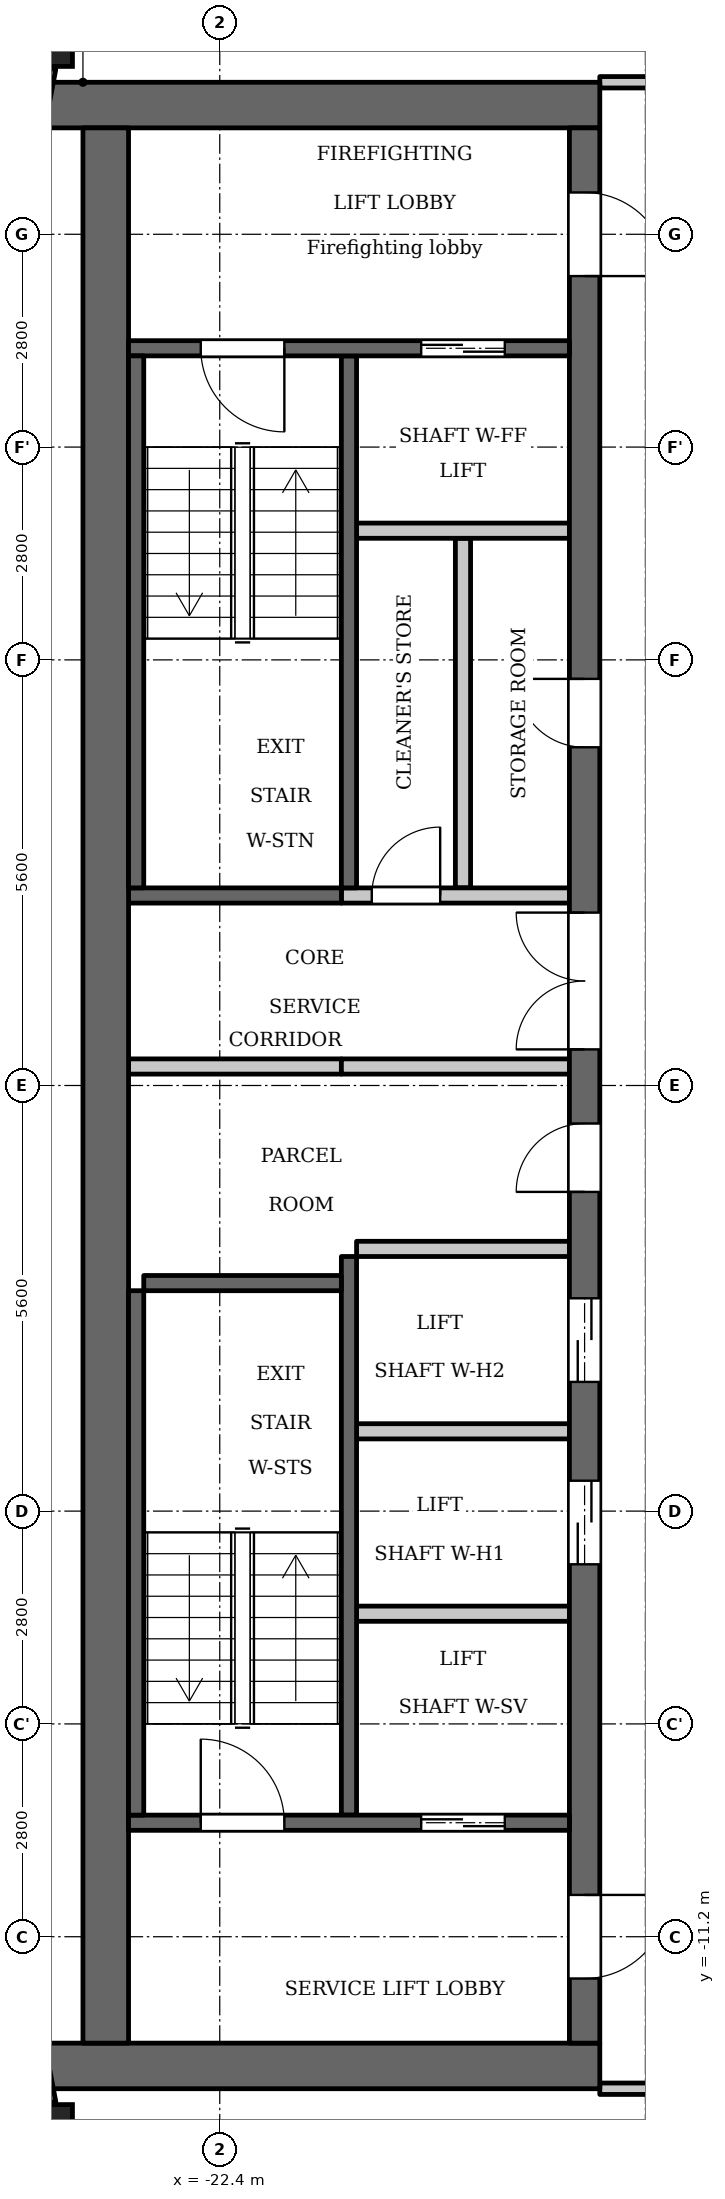
"""IFC4 building model, lengths in metres.
Left out: names, types, materials, properties, quantities, classifications, styles, units other than length and angle.
Written with IfcOpenShell. Run it as: python <this file> out.ifc"""

import sys

from ifc_helpers import new_model, si_unit, direction, frame, frame_2d, origin, origin_2d, place, context, subcontext, project, spatial, rectangle, extrude, element, fill, save


model = new_model("IFC4")
c1 = context("Model", 3, precision=1e-05, world=origin(), true_north=direction((0.0, 1.0)))
c2 = subcontext(c1, "Body", "Model", "MODEL_VIEW")
j1 = project(units=[si_unit("LENGTHUNIT", "METRE"), si_unit("PLANEANGLEUNIT", "RADIAN")], contexts=[c1])
p1 = place(None, origin())
s1 = spatial("IfcSite", under=j1, at=p1, CompositionType="ELEMENT")
p2 = place(p1, origin())
s2 = spatial("IfcBuilding", under=s1, at=p2, CompositionType="ELEMENT")
p3 = place(p2, frame((0.0, 0.0, 252.2)))
s3 = spatial("IfcBuildingStorey", under=s2, at=p3, CompositionType="ELEMENT", Elevation=252.2)
for number, where, z_axis, x_axis in (
    (1, (-24.738, 13.809, 0.0), (0.0, 0.0, 1.0), (1.0, 0.0, 0.0)),
    (2, (-24.738, -13.809, 0.0), (0.0, 0.0, 1.0), (1.0, 0.0, 0.0)),
):
    element("IfcColumn", number, at=place(p3, frame(where, z_axis=z_axis, x_axis=x_axis)), inside=s3, PredefinedType="COLUMN", context=c2, shape_type="SweptSolid", body=[
        extrude(rectangle(XDim=0.8, YDim=0.8, at=origin_2d()), origin(), (0.0, 0.0, 1.0), 3.5),
    ])
for number, where, z_axis, x_axis in (
    (3, (-24.705, 13.395, 0.0), (0.0, 0.0, 1.0), (-0.187, -0.982, 0.0)),
    (4, (-25.053, -11.572, 0.0), (0.0, 0.0, 1.0), (0.187, -0.982, 0.0)),
):
    element("IfcWall", number, at=place(p3, frame(where, z_axis=z_axis, x_axis=x_axis)), inside=s3, PredefinedType="SOLIDWALL", context=c2, shape_type="SweptSolid", body=[
        extrude(rectangle(XDim=1.856, YDim=0.3, at=frame_2d((0.928, 0.0))), origin(), (0.0, 0.0, 1.0), 2.55),
    ])
p4 = place(p3, frame((-20.7, 2.6, 0.0), z_axis=(0.0, 0.0, 1.0), x_axis=(0.0, 1.0, 0.0)))
e5 = element("IfcWall", 5, at=p4, inside=s3, PredefinedType="SHEAR", context=c2, shape_type="SweptSolid", body=[
    extrude(rectangle(XDim=7.0, YDim=0.2, at=frame_2d((3.5, 0.0))), origin(), (0.0, 0.0, 1.0), 3.2),
])
p5 = place(p3, frame((-20.7, -9.6, 0.0), z_axis=(0.0, 0.0, 1.0), x_axis=(0.0, 1.0, 0.0)))
e6 = element("IfcWall", 6, at=p5, inside=s3, PredefinedType="SHEAR", context=c2, shape_type="SweptSolid", body=[
    extrude(rectangle(XDim=7.35, YDim=0.2, at=frame_2d((3.675, 0.0))), origin(), (0.0, 0.0, 1.0), 3.2),
])
p6 = place(p3, frame((-20.8, 2.5, 0.0), z_axis=(0.0, 0.0, 1.0), x_axis=(-1.0, 0.0, 0.0)))
e7 = element("IfcWall", 7, at=p6, inside=s3, PredefinedType="SHEAR", context=c2, shape_type="SweptSolid", body=[
    extrude(rectangle(XDim=2.8, YDim=0.2, at=frame_2d((1.4, 0.0))), origin(), (0.0, 0.0, 1.0), 3.2),
])
p7 = place(p3, frame((-20.8, 0.25, 0.0), z_axis=(0.0, 0.0, 1.0), x_axis=(-1.0, 0.0, 0.0)))
e8 = element("IfcWall", 8, at=p7, inside=s3, PredefinedType="PARTITIONING", context=c2, shape_type="SweptSolid", body=[
    extrude(rectangle(XDim=2.8, YDim=0.2, at=frame_2d((1.4, 0.0))), origin(), (0.0, 0.0, 1.0), 3.2),
])
for number, where, z_axis, x_axis in (
    (9, (-17.4, 12.9, 0.0), (0.0, 0.0, 1.0), (-1.0, 0.0, 0.0)),
    (10, (-17.4, -12.9, 0.0), (0.0, 0.0, 1.0), (-1.0, 0.0, 0.0)),
):
    element("IfcWall", number, at=place(p3, frame(where, z_axis=z_axis, x_axis=x_axis)), inside=s3, PredefinedType="SHEAR", context=c2, shape_type="SweptSolid", body=[
        extrude(rectangle(XDim=7.32, YDim=0.6, at=frame_2d((3.66, 0.0))), origin(), (0.0, 0.0, 1.0), 3.2),
    ])
p8 = place(p3, frame((-19.2, 2.6, 0.0), z_axis=(0.0, 0.0, 1.0), x_axis=(0.0, 1.0, 0.0)))
e11 = element("IfcWall", 11, at=p8, inside=s3, PredefinedType="PARTITIONING", context=c2, shape_type="SweptSolid", body=[
    extrude(rectangle(XDim=4.6, YDim=0.2, at=frame_2d((2.3, 0.0))), origin(), (0.0, 0.0, 1.0), 3.2),
])
p9 = place(p3, frame((-17.6, -12.6, 0.0), z_axis=(0.0, 0.0, 1.0), x_axis=(0.0, 1.0, 0.0)))
e12 = element("IfcWall", 12, at=p9, inside=s3, PredefinedType="SHEAR", context=c2, shape_type="SweptSolid", body=[
    extrude(rectangle(XDim=25.2, YDim=0.4, at=frame_2d((12.6, 0.0))), origin(), (0.0, 0.0, 1.0), 3.2),
])
p10 = place(p9, frame((6.3, 0.0, 0.0)))
e13 = element("IfcOpeningElement", 13, at=p10, cuts=e12, PredefinedType="OPENING", context=c2, shape_type="SweptSolid", body=[
    extrude(rectangle(XDim=1.1, YDim=2.1, at=frame_2d((0.55, 1.05))), frame((0.0, 0.21, 0.0), z_axis=(0.0, -1.0, 0.0), x_axis=(1.0, 0.0, 0.0)), (0.0, 0.0, 1.0), 0.42),
])
p11 = place(p9, frame((8.7, 0.0, 0.0)))
e14 = element("IfcOpeningElement", 14, at=p11, cuts=e12, PredefinedType="OPENING", context=c2, shape_type="SweptSolid", body=[
    extrude(rectangle(XDim=1.1, YDim=2.1, at=frame_2d((0.55, 1.05))), frame((0.0, 0.21, 0.0), z_axis=(0.0, -1.0, 0.0), x_axis=(1.0, 0.0, 0.0)), (0.0, 0.0, 1.0), 0.42),
])
p12 = place(p9, frame((11.2, 0.0, 0.0)))
e15 = element("IfcOpeningElement", 15, at=p12, cuts=e12, PredefinedType="OPENING", context=c2, shape_type="SweptSolid", body=[
    extrude(rectangle(XDim=0.9, YDim=2.1, at=frame_2d((0.45, 1.05))), frame((0.0, 0.21, 0.0), z_axis=(0.0, -1.0, 0.0), x_axis=(1.0, 0.0, 0.0)), (0.0, 0.0, 1.0), 0.42),
])
p13 = place(p9, frame((17.05, 0.0, 0.0)))
e16 = element("IfcOpeningElement", 16, at=p13, cuts=e12, PredefinedType="OPENING", context=c2, shape_type="SweptSolid", body=[
    extrude(rectangle(XDim=0.9, YDim=2.1, at=frame_2d((0.45, 1.05))), frame((0.0, 0.21, 0.0), z_axis=(0.0, -1.0, 0.0), x_axis=(1.0, 0.0, 0.0)), (0.0, 0.0, 1.0), 0.42),
])
p14 = place(p9, frame((23.25, 0.0, 0.0)))
e17 = element("IfcOpeningElement", 17, at=p14, cuts=e12, PredefinedType="OPENING", context=c2, shape_type="SweptSolid", body=[
    extrude(rectangle(XDim=1.1, YDim=2.1, at=frame_2d((0.55, 1.05))), frame((0.0, 0.21, 0.0), z_axis=(0.0, -1.0, 0.0), x_axis=(1.0, 0.0, 0.0)), (0.0, 0.0, 1.0), 0.42),
])
p15 = place(p9, frame((0.85, 0.0, 0.0)))
e18 = element("IfcOpeningElement", 18, at=p15, cuts=e12, PredefinedType="OPENING", context=c2, shape_type="SweptSolid", body=[
    extrude(rectangle(XDim=1.1, YDim=2.1, at=frame_2d((0.55, 1.05))), frame((0.0, 0.21, 0.0), z_axis=(0.0, -1.0, 0.0), x_axis=(1.0, 0.0, 0.0)), (0.0, 0.0, 1.0), 0.42),
])
p16 = place(p9, frame((13.075, 0.0, 0.0)))
e19 = element("IfcOpeningElement", 19, at=p16, cuts=e12, PredefinedType="OPENING", context=c2, shape_type="SweptSolid", body=[
    extrude(rectangle(XDim=1.8, YDim=2.1, at=frame_2d((0.9, 1.05))), frame((0.0, 0.21, 0.0), z_axis=(0.0, -1.0, 0.0), x_axis=(1.0, 0.0, 0.0)), (0.0, 0.0, 1.0), 0.42),
])
p17 = place(p3, frame((-23.9, -12.6, 0.0), z_axis=(0.0, 0.0, 1.0), x_axis=(0.0, 1.0, 0.0)))
e20 = element("IfcWall", 20, at=p17, inside=s3, PredefinedType="SHEAR", context=c2, shape_type="SweptSolid", body=[
    extrude(rectangle(XDim=25.2, YDim=0.6, at=frame_2d((12.6, 0.0))), origin(), (0.0, 0.0, 1.0), 3.2),
])
p18 = place(p3, frame((-17.8, -9.7, 0.0), z_axis=(0.0, 0.0, 1.0), x_axis=(-1.0, 0.0, 0.0)))
e21 = element("IfcWall", 21, at=p18, inside=s3, PredefinedType="SHEAR", context=c2, shape_type="SweptSolid", body=[
    extrude(rectangle(XDim=5.8, YDim=0.2, at=frame_2d((2.9, 0.0))), origin(), (0.0, 0.0, 1.0), 3.2),
])
p19 = place(p18, frame((0.85, 0.0, 0.0)))
e22 = element("IfcOpeningElement", 22, at=p19, cuts=e21, PredefinedType="OPENING", context=c2, shape_type="SweptSolid", body=[
    extrude(rectangle(XDim=1.1, YDim=2.1, at=frame_2d((0.55, 1.05))), frame((0.0, 0.11, 0.0), z_axis=(0.0, -1.0, 0.0), x_axis=(1.0, 0.0, 0.0)), (0.0, 0.0, 1.0), 0.22),
])
p20 = place(p18, frame((3.75, 0.0, 0.0)))
e23 = element("IfcOpeningElement", 23, at=p20, cuts=e21, PredefinedType="OPENING", context=c2, shape_type="SweptSolid", body=[
    extrude(rectangle(XDim=1.1, YDim=2.1, at=frame_2d((0.55, 1.05))), frame((0.0, 0.11, 0.0), z_axis=(0.0, -1.0, 0.0), x_axis=(1.0, 0.0, 0.0)), (0.0, 0.0, 1.0), 0.22),
])
for number, where, z_axis, x_axis in (
    (24, (-17.8, -6.95, 0.0), (0.0, 0.0, 1.0), (-1.0, 0.0, 0.0)),
    (25, (-17.8, -4.55, 0.0), (0.0, 0.0, 1.0), (-1.0, 0.0, 0.0)),
    (26, (-17.8, -2.15, 0.0), (0.0, 0.0, 1.0), (-1.0, 0.0, 0.0)),
):
    element("IfcWall", number, at=place(p3, frame(where, z_axis=z_axis, x_axis=x_axis)), inside=s3, PredefinedType="PARTITIONING", context=c2, shape_type="SweptSolid", body=[
        extrude(rectangle(XDim=2.8, YDim=0.2, at=frame_2d((1.4, 0.0))), origin(), (0.0, 0.0, 1.0), 3.2),
    ])
p21 = place(p3, frame((-17.8, 0.25, 0.0), z_axis=(0.0, 0.0, 1.0), x_axis=(-1.0, 0.0, 0.0)))
e27 = element("IfcWall", 27, at=p21, inside=s3, PredefinedType="PARTITIONING", context=c2, shape_type="SweptSolid", body=[
    extrude(rectangle(XDim=3.0, YDim=0.2, at=frame_2d((1.5, 0.0))), origin(), (0.0, 0.0, 1.0), 3.2),
])
p22 = place(p3, frame((-17.8, 2.5, 0.0), z_axis=(0.0, 0.0, 1.0), x_axis=(-1.0, 0.0, 0.0)))
e28 = element("IfcWall", 28, at=p22, inside=s3, PredefinedType="PARTITIONING", context=c2, shape_type="SweptSolid", body=[
    extrude(rectangle(XDim=3.0, YDim=0.2, at=frame_2d((1.5, 0.0))), origin(), (0.0, 0.0, 1.0), 3.2),
])
p23 = place(p22, frame((1.7, 0.0, 0.0)))
e29 = element("IfcOpeningElement", 29, at=p23, cuts=e28, PredefinedType="OPENING", context=c2, shape_type="SweptSolid", body=[
    extrude(rectangle(XDim=0.9, YDim=2.1, at=frame_2d((0.45, 1.05))), frame((0.0, 0.11, 0.0), z_axis=(0.0, -1.0, 0.0), x_axis=(1.0, 0.0, 0.0)), (0.0, 0.0, 1.0), 0.22),
])
p24 = place(p3, frame((-17.8, 7.3, 0.0), z_axis=(0.0, 0.0, 1.0), x_axis=(-1.0, 0.0, 0.0)))
e30 = element("IfcWall", 30, at=p24, inside=s3, PredefinedType="PARTITIONING", context=c2, shape_type="SweptSolid", body=[
    extrude(rectangle(XDim=2.8, YDim=0.2, at=frame_2d((1.4, 0.0))), origin(), (0.0, 0.0, 1.0), 3.2),
])
p25 = place(p3, frame((-17.8, 9.7, 0.0), z_axis=(0.0, 0.0, 1.0), x_axis=(-1.0, 0.0, 0.0)))
e31 = element("IfcWall", 31, at=p25, inside=s3, PredefinedType="SHEAR", context=c2, shape_type="SweptSolid", body=[
    extrude(rectangle(XDim=5.8, YDim=0.2, at=frame_2d((2.9, 0.0))), origin(), (0.0, 0.0, 1.0), 3.2),
])
p26 = place(p25, frame((0.85, 0.0, 0.0)))
e32 = element("IfcOpeningElement", 32, at=p26, cuts=e31, PredefinedType="OPENING", context=c2, shape_type="SweptSolid", body=[
    extrude(rectangle(XDim=1.1, YDim=2.1, at=frame_2d((0.55, 1.05))), frame((0.0, 0.11, 0.0), z_axis=(0.0, -1.0, 0.0), x_axis=(1.0, 0.0, 0.0)), (0.0, 0.0, 1.0), 0.22),
])
p27 = place(p25, frame((3.75, 0.0, 0.0)))
e33 = element("IfcOpeningElement", 33, at=p27, cuts=e31, PredefinedType="OPENING", context=c2, shape_type="SweptSolid", body=[
    extrude(rectangle(XDim=1.1, YDim=2.1, at=frame_2d((0.55, 1.05))), frame((0.0, 0.11, 0.0), z_axis=(0.0, -1.0, 0.0), x_axis=(1.0, 0.0, 0.0)), (0.0, 0.0, 1.0), 0.22),
])
p28 = place(p3, frame((-23.5, 2.6, 0.0), z_axis=(0.0, 0.0, 1.0), x_axis=(0.0, 1.0, 0.0)))
e34 = element("IfcWall", 34, at=p28, inside=s3, PredefinedType="SHEAR", context=c2, shape_type="SweptSolid", body=[
    extrude(rectangle(XDim=7.0, YDim=0.2, at=frame_2d((3.5, 0.0))), origin(), (0.0, 0.0, 1.0), 3.2),
])
p29 = place(p3, frame((-23.5, -9.6, 0.0), z_axis=(0.0, 0.0, 1.0), x_axis=(0.0, 1.0, 0.0)))
e35 = element("IfcWall", 35, at=p29, inside=s3, PredefinedType="SHEAR", context=c2, shape_type="SweptSolid", body=[
    extrude(rectangle(XDim=6.9, YDim=0.2, at=frame_2d((3.45, 0.0))), origin(), (0.0, 0.0, 1.0), 3.2),
])
p30 = place(p3, frame((-20.8, -2.6, 0.0), z_axis=(0.0, 0.0, 1.0), x_axis=(-1.0, 0.0, 0.0)))
e36 = element("IfcWall", 36, at=p30, inside=s3, PredefinedType="SHEAR", context=c2, shape_type="SweptSolid", body=[
    extrude(rectangle(XDim=2.6, YDim=0.2, at=frame_2d((1.3, 0.0))), origin(), (0.0, 0.0, 1.0), 3.2),
])
p31 = place(p3, frame((-17.4, -13.2, 0.0), z_axis=(0.0, 0.0, 1.0), x_axis=(1.0, 0.0, 0.0)))
e37 = element("IfcWall", 37, at=p31, inside=s3, PredefinedType="PARTITIONING", context=c2, shape_type="SweptSolid", body=[
    extrude(rectangle(XDim=2.325, YDim=0.15, at=frame_2d((1.163, 0.0))), origin(), (0.0, 0.0, 1.0), 3.2),
])
p32 = place(p31, frame((0.65, 0.0, 0.0)))
e38 = element("IfcOpeningElement", 38, at=p32, cuts=e37, PredefinedType="OPENING", context=c2, shape_type="SweptSolid", body=[
    extrude(rectangle(XDim=1.0, YDim=2.1, at=frame_2d((0.5, 1.05))), frame((0.0, 0.085, 0.0), z_axis=(0.0, -1.0, 0.0), x_axis=(1.0, 0.0, 0.0)), (0.0, 0.0, 1.0), 0.17),
])
p33 = place(p3, frame((-17.4, 13.2, 0.0), z_axis=(0.0, 0.0, 1.0), x_axis=(1.0, 0.0, 0.0)))
e39 = element("IfcWall", 39, at=p33, inside=s3, PredefinedType="PARTITIONING", context=c2, shape_type="SweptSolid", body=[
    extrude(rectangle(XDim=2.325, YDim=0.15, at=frame_2d((1.163, 0.0))), origin(), (0.0, 0.0, 1.0), 3.2),
])
p34 = place(p33, frame((0.75, 0.0, 0.0)))
e40 = element("IfcOpeningElement", 40, at=p34, cuts=e39, PredefinedType="OPENING", context=c2, shape_type="SweptSolid", body=[
    extrude(rectangle(XDim=1.0, YDim=2.1, at=frame_2d((0.5, 1.05))), frame((0.0, 0.085, 0.0), z_axis=(0.0, -1.0, 0.0), x_axis=(1.0, 0.0, 0.0)), (0.0, 0.0, 1.0), 0.17),
])
p35 = place(p19, origin())
e41 = element("IfcDoor", 41, at=p35, inside=s3, OperationType="DOUBLE_DOOR_SLIDING", PredefinedType="DOOR", context=c2, shape_type="SweptSolid", body=[
    extrude(rectangle(XDim=1.1, YDim=2.1, at=frame_2d((0.55, 1.05))), frame((0.0, 0.025, 0.0), z_axis=(0.0, -1.0, 0.0), x_axis=(1.0, 0.0, 0.0)), (0.0, 0.0, 1.0), 0.05),
])
fill(e22, e41)
p36 = place(p10, origin())
e42 = element("IfcDoor", 42, at=p36, inside=s3, OperationType="DOUBLE_DOOR_SLIDING", PredefinedType="DOOR", context=c2, shape_type="SweptSolid", body=[
    extrude(rectangle(XDim=1.1, YDim=2.1, at=frame_2d((0.55, 1.05))), frame((0.0, 0.025, 0.0), z_axis=(0.0, -1.0, 0.0), x_axis=(1.0, 0.0, 0.0)), (0.0, 0.0, 1.0), 0.05),
])
fill(e13, e42)
p37 = place(p11, origin())
e43 = element("IfcDoor", 43, at=p37, inside=s3, OperationType="DOUBLE_DOOR_SLIDING", PredefinedType="DOOR", context=c2, shape_type="SweptSolid", body=[
    extrude(rectangle(XDim=1.1, YDim=2.1, at=frame_2d((0.55, 1.05))), frame((0.0, 0.025, 0.0), z_axis=(0.0, -1.0, 0.0), x_axis=(1.0, 0.0, 0.0)), (0.0, 0.0, 1.0), 0.05),
])
fill(e14, e43)
p38 = place(p12, origin())
e44 = element("IfcDoor", 44, at=p38, inside=s3, OperationType="SINGLE_SWING_RIGHT", PredefinedType="DOOR", context=c2, shape_type="SweptSolid", body=[
    extrude(rectangle(XDim=0.9, YDim=2.1, at=frame_2d((0.45, 1.05))), frame((0.0, 0.025, 0.0), z_axis=(0.0, -1.0, 0.0), x_axis=(1.0, 0.0, 0.0)), (0.0, 0.0, 1.0), 0.05),
])
fill(e15, e44)
p39 = place(p13, origin())
e45 = element("IfcDoor", 45, at=p39, inside=s3, OperationType="SINGLE_SWING_LEFT", PredefinedType="DOOR", context=c2, shape_type="SweptSolid", body=[
    extrude(rectangle(XDim=0.9, YDim=2.1, at=frame_2d((0.45, 1.05))), frame((0.0, 0.025, 0.0), z_axis=(0.0, -1.0, 0.0), x_axis=(1.0, 0.0, 0.0)), (0.0, 0.0, 1.0), 0.05),
])
fill(e16, e45)
p40 = place(p23, origin())
e46 = element("IfcDoor", 46, at=p40, inside=s3, OperationType="SINGLE_SWING_LEFT", PredefinedType="DOOR", context=c2, shape_type="SweptSolid", body=[
    extrude(rectangle(XDim=0.9, YDim=2.1, at=frame_2d((0.45, 1.05))), frame((0.0, 0.025, 0.0), z_axis=(0.0, -1.0, 0.0), x_axis=(1.0, 0.0, 0.0)), (0.0, 0.0, 1.0), 0.05),
])
fill(e29, e46)
p41 = place(p26, origin())
e47 = element("IfcDoor", 47, at=p41, inside=s3, OperationType="DOUBLE_DOOR_SLIDING", PredefinedType="DOOR", context=c2, shape_type="SweptSolid", body=[
    extrude(rectangle(XDim=1.1, YDim=2.1, at=frame_2d((0.55, 1.05))), frame((0.0, 0.025, 0.0), z_axis=(0.0, -1.0, 0.0), x_axis=(1.0, 0.0, 0.0)), (0.0, 0.0, 1.0), 0.05),
])
fill(e32, e47)
p42 = place(p14, origin())
e48 = element("IfcDoor", 48, at=p42, inside=s3, OperationType="SINGLE_SWING_LEFT", PredefinedType="DOOR", context=c2, shape_type="SweptSolid", body=[
    extrude(rectangle(XDim=1.1, YDim=2.1, at=frame_2d((0.55, 1.05))), frame((0.0, 0.025, 0.0), z_axis=(0.0, -1.0, 0.0), x_axis=(1.0, 0.0, 0.0)), (0.0, 0.0, 1.0), 0.05),
])
fill(e17, e48)
p43 = place(p15, origin())
e49 = element("IfcDoor", 49, at=p43, inside=s3, OperationType="SINGLE_SWING_RIGHT", PredefinedType="DOOR", context=c2, shape_type="SweptSolid", body=[
    extrude(rectangle(XDim=1.1, YDim=2.1, at=frame_2d((0.55, 1.05))), frame((0.0, 0.025, 0.0), z_axis=(0.0, -1.0, 0.0), x_axis=(1.0, 0.0, 0.0)), (0.0, 0.0, 1.0), 0.05),
])
fill(e18, e49)
p44 = place(p27, origin())
e50 = element("IfcDoor", 50, at=p44, inside=s3, OperationType="SINGLE_SWING_RIGHT", PredefinedType="DOOR", context=c2, shape_type="SweptSolid", body=[
    extrude(rectangle(XDim=1.1, YDim=2.1, at=frame_2d((0.55, 1.05))), frame((0.0, 0.025, 0.0), z_axis=(0.0, -1.0, 0.0), x_axis=(1.0, 0.0, 0.0)), (0.0, 0.0, 1.0), 0.05),
])
fill(e33, e50)
p45 = place(p20, origin())
e51 = element("IfcDoor", 51, at=p45, inside=s3, OperationType="SINGLE_SWING_RIGHT", PredefinedType="DOOR", context=c2, shape_type="SweptSolid", body=[
    extrude(rectangle(XDim=1.1, YDim=2.1, at=frame_2d((0.55, 1.05))), frame((0.0, 0.025, 0.0), z_axis=(0.0, -1.0, 0.0), x_axis=(1.0, 0.0, 0.0)), (0.0, 0.0, 1.0), 0.05),
])
fill(e23, e51)
p46 = place(p16, origin())
e52 = element("IfcDoor", 52, at=p46, inside=s3, OperationType="DOUBLE_DOOR_SINGLE_SWING", PredefinedType="DOOR", context=c2, shape_type="SweptSolid", body=[
    extrude(rectangle(XDim=1.8, YDim=2.1, at=frame_2d((0.9, 1.05))), frame((0.0, 0.025, 0.0), z_axis=(0.0, -1.0, 0.0), x_axis=(1.0, 0.0, 0.0)), (0.0, 0.0, 1.0), 0.05),
])
fill(e19, e52)
save(model, sys.argv[1])
